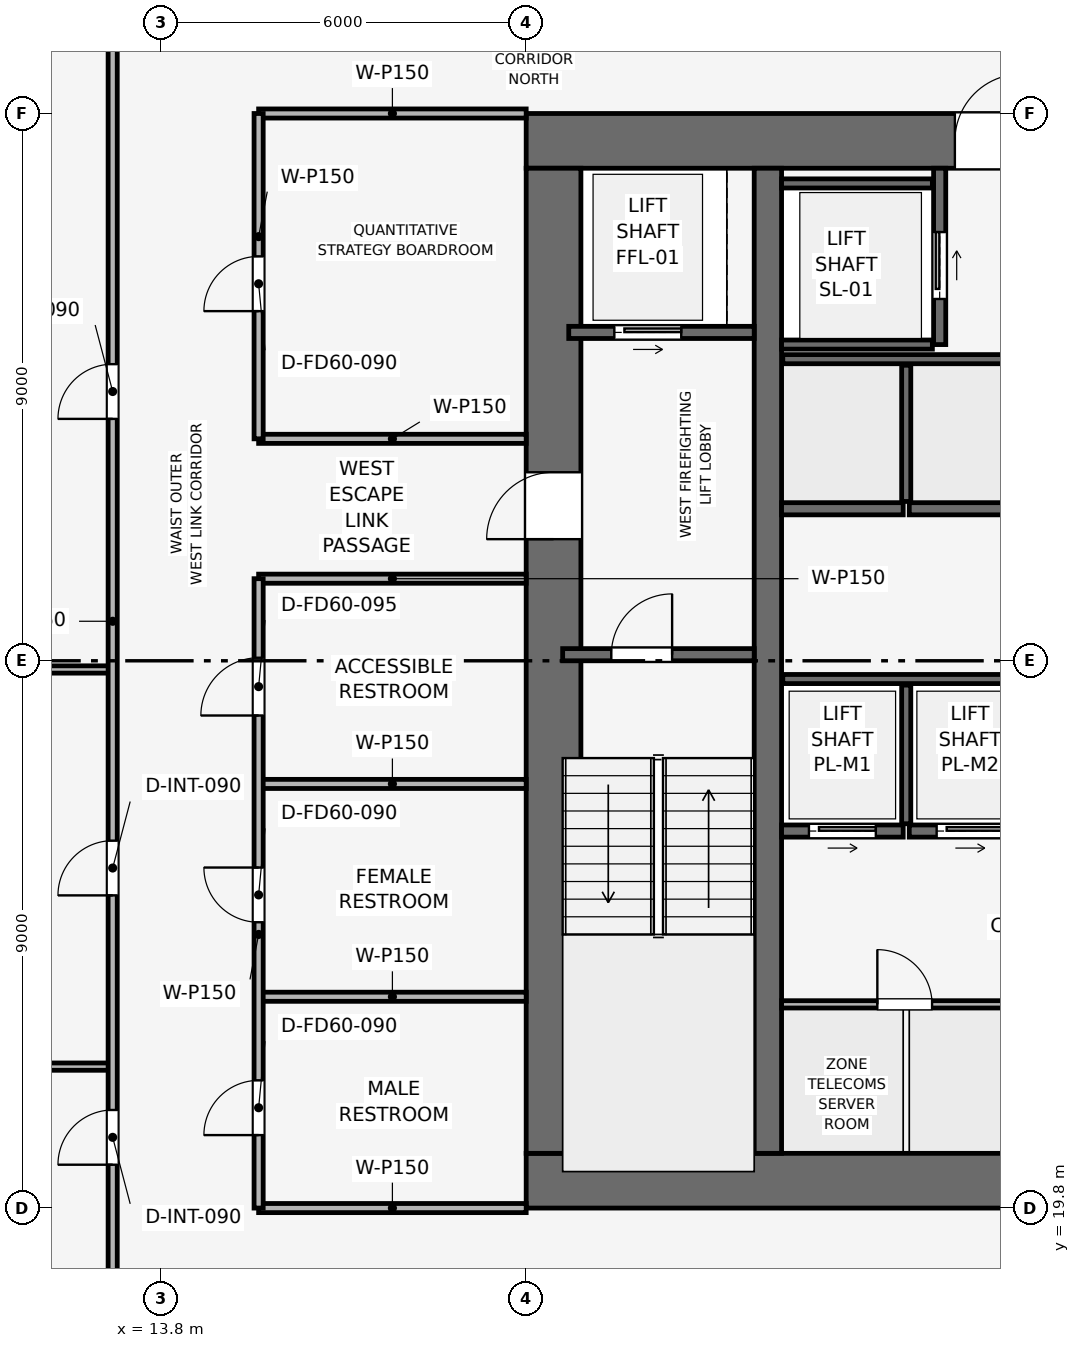
"""IFC4 building model, lengths in metres.
Left out: names, types, materials, properties, quantities, classifications, styles, units other than length and angle.
Written with IfcOpenShell. Run it as: python <this file> out.ifc"""

import sys

from ifc_helpers import new_model, si_unit, direction, frame, frame_2d, origin, place, context, subcontext, project, spatial, rectangle, extrude, element, fill, save


model = new_model("IFC4")
c1 = context("Model", 3, precision=1e-05, world=origin(), true_north=direction((0.0, 1.0)))
c2 = subcontext(c1, "Body", "Model", "MODEL_VIEW")
j1 = project(units=[si_unit("LENGTHUNIT", "METRE"), si_unit("PLANEANGLEUNIT", "RADIAN")], contexts=[c1])
p1 = place(None, origin())
s1 = spatial("IfcSite", under=j1, at=p1, CompositionType="ELEMENT")
p2 = place(p1, origin())
s2 = spatial("IfcBuilding", under=s1, at=p2, CompositionType="ELEMENT")
p3 = place(p2, frame((0.0, 0.0, 179.55)))
s3 = spatial("IfcBuildingStorey", under=s2, at=p3, CompositionType="ELEMENT", Elevation=179.55)
p4 = place(p3, frame((19.8, 20.25, 0.0), z_axis=(0.0, 0.0, 1.0), x_axis=(1.0, 0.0, 0.0)))
e1 = element("IfcWall", 1, at=p4, inside=s3, PredefinedType="SHEAR", context=c2, shape_type="SweptSolid", body=[
    extrude(rectangle(XDim=18.0, YDim=0.9, at=frame_2d((9.0, 0.0))), origin(), (0.0, 0.0, 1.0), 3.75),
])
p5 = place(p4, frame((8.4, 0.0, 0.0)))
e2 = element("IfcOpeningElement", 2, at=p5, cuts=e1, PredefinedType="OPENING", context=c2, shape_type="SweptSolid", body=[
    extrude(rectangle(XDim=1.2, YDim=2.2, at=frame_2d((0.6, 1.1))), frame((0.0, 0.46, 0.0), z_axis=(0.0, -1.0, 0.0), x_axis=(1.0, 0.0, 0.0)), (0.0, 0.0, 1.0), 0.92),
])
p6 = place(p3, frame((19.8, 37.35, 0.0), z_axis=(0.0, 0.0, 1.0), x_axis=(1.0, 0.0, 0.0)))
e3 = element("IfcWall", 3, at=p6, inside=s3, PredefinedType="SHEAR", context=c2, shape_type="SweptSolid", body=[
    extrude(rectangle(XDim=18.0, YDim=0.9, at=frame_2d((9.0, 0.0))), origin(), (0.0, 0.0, 1.0), 3.75),
])
p7 = place(p6, frame((7.05, 0.0, 0.0)))
e4 = element("IfcOpeningElement", 4, at=p7, cuts=e3, PredefinedType="OPENING", context=c2, shape_type="SweptSolid", body=[
    extrude(rectangle(XDim=1.1, YDim=2.15, at=frame_2d((0.55, 1.075))), frame((0.0, 0.46, 0.0), z_axis=(0.0, -1.0, 0.0), x_axis=(1.0, 0.0, 0.0)), (0.0, 0.0, 1.0), 0.92),
])
p8 = place(p3, frame((20.25, 20.7, 0.0), z_axis=(0.0, 0.0, 1.0), x_axis=(0.0, 1.0, 0.0)))
e5 = element("IfcWall", 5, at=p8, inside=s3, PredefinedType="SHEAR", context=c2, shape_type="SweptSolid", body=[
    extrude(rectangle(XDim=16.2, YDim=0.9, at=frame_2d((8.1, 0.0))), origin(), (0.0, 0.0, 1.0), 3.75),
])
p9 = place(p8, frame((10.1, 0.0, 0.0)))
e6 = element("IfcOpeningElement", 6, at=p9, cuts=e5, PredefinedType="OPENING", context=c2, shape_type="SweptSolid", body=[
    extrude(rectangle(XDim=1.1, YDim=2.15, at=frame_2d((0.55, 1.075))), frame((0.0, 0.46, 0.0), z_axis=(0.0, -1.0, 0.0), x_axis=(1.0, 0.0, 0.0)), (0.0, 0.0, 1.0), 0.92),
])
p10 = place(p3, frame((23.775, 20.7, 0.0), z_axis=(0.0, 0.0, 1.0), x_axis=(0.0, 1.0, 0.0)))
e7 = element("IfcWall", 7, at=p10, inside=s3, PredefinedType="SHEAR", context=c2, shape_type="SweptSolid", body=[
    extrude(rectangle(XDim=16.2, YDim=0.45, at=frame_2d((8.1, 0.0))), origin(), (0.0, 0.0, 1.0), 3.75),
])
p11 = place(p3, frame((20.4, 28.9, 0.0), z_axis=(0.0, 0.0, 1.0), x_axis=(1.0, 0.0, 0.0)))
e8 = element("IfcWall", 8, at=p11, inside=s3, PredefinedType="SHEAR", context=c2, shape_type="SweptSolid", body=[
    extrude(rectangle(XDim=3.15, YDim=0.2, at=frame_2d((1.575, 0.0))), origin(), (0.0, 0.0, 1.0), 3.495),
])
p12 = place(p11, frame((0.8, 0.0, 0.0)))
e9 = element("IfcOpeningElement", 9, at=p12, cuts=e8, PredefinedType="OPENING", context=c2, shape_type="SweptSolid", body=[
    extrude(rectangle(XDim=1.0, YDim=2.1, at=frame_2d((0.5, 1.05))), frame((0.0, 0.11, 0.0), z_axis=(0.0, -1.0, 0.0), x_axis=(1.0, 0.0, 0.0)), (0.0, 0.0, 1.0), 0.22),
])
p13 = place(p3, frame((20.5, 34.2, 0.0), z_axis=(0.0, 0.0, 1.0), x_axis=(1.0, 0.0, 0.0)))
e10 = element("IfcWall", 10, at=p13, inside=s3, PredefinedType="SHEAR", context=c2, shape_type="SweptSolid", body=[
    extrude(rectangle(XDim=3.05, YDim=0.2, at=frame_2d((1.525, 0.0))), origin(), (0.0, 0.0, 1.0), 3.495),
])
p14 = place(p13, frame((0.75, 0.0, 0.0)))
e11 = element("IfcOpeningElement", 11, at=p14, cuts=e10, PredefinedType="OPENING", context=c2, shape_type="SweptSolid", body=[
    extrude(rectangle(XDim=1.1, YDim=2.15, at=frame_2d((0.55, 1.075))), frame((0.0, 0.11, 0.0), z_axis=(0.0, -1.0, 0.0), x_axis=(1.0, 0.0, 0.0)), (0.0, 0.0, 1.0), 0.22),
])
p15 = place(p3, frame((26.6, 34.0, 0.0), z_axis=(0.0, 0.0, 1.0), x_axis=(0.0, 1.0, 0.0)))
e12 = element("IfcWall", 12, at=p15, inside=s3, PredefinedType="SHEAR", context=c2, shape_type="SweptSolid", body=[
    extrude(rectangle(XDim=2.9, YDim=0.2, at=frame_2d((1.45, 0.0))), origin(), (0.0, 0.0, 1.0), 3.495),
])
p16 = place(p15, frame((0.75, 0.0, 0.0)))
e13 = element("IfcOpeningElement", 13, at=p16, cuts=e12, PredefinedType="OPENING", context=c2, shape_type="SweptSolid", body=[
    extrude(rectangle(XDim=1.1, YDim=2.15, at=frame_2d((0.55, 1.075))), frame((0.0, 0.11, 0.0), z_axis=(0.0, -1.0, 0.0), x_axis=(1.0, 0.0, 0.0)), (0.0, 0.0, 1.0), 0.22),
])
for number, where, z_axis, x_axis in (
    (14, (24.0, 34.0, 0.0), (0.0, 0.0, 1.0), (1.0, 0.0, 0.0)),
    (15, (24.0, 36.65, 0.0), (0.0, 0.0, 1.0), (1.0, 0.0, 0.0)),
):
    element("IfcWall", number, at=place(p3, frame(where, z_axis=z_axis, x_axis=x_axis)), inside=s3, PredefinedType="SHEAR", context=c2, shape_type="SweptSolid", body=[
        extrude(rectangle(XDim=2.48, YDim=0.15, at=frame_2d((1.24, 0.0))), origin(), (0.0, 0.0, 1.0), 3.495),
    ])
p17 = place(p3, frame((24.0, 26.0, 0.0), z_axis=(0.0, 0.0, 1.0), x_axis=(1.0, 0.0, 0.0)))
e16 = element("IfcWall", 16, at=p17, inside=s3, PredefinedType="SHEAR", context=c2, shape_type="SweptSolid", body=[
    extrude(rectangle(XDim=2.0, YDim=0.2, at=frame_2d((1.0, 0.0))), origin(), (0.0, 0.0, 1.0), 3.495),
])
p18 = place(p17, frame((0.45, 0.0, 0.0)))
e17 = element("IfcOpeningElement", 17, at=p18, cuts=e16, PredefinedType="OPENING", context=c2, shape_type="SweptSolid", body=[
    extrude(rectangle(XDim=1.1, YDim=2.15, at=frame_2d((0.55, 1.075))), frame((0.0, 0.11, 0.0), z_axis=(0.0, -1.0, 0.0), x_axis=(1.0, 0.0, 0.0)), (0.0, 0.0, 1.0), 0.22),
])
p19 = place(p3, frame((26.1, 26.0, 0.0), z_axis=(0.0, 0.0, 1.0), x_axis=(1.0, 0.0, 0.0)))
e18 = element("IfcWall", 18, at=p19, inside=s3, PredefinedType="SHEAR", context=c2, shape_type="SweptSolid", body=[
    extrude(rectangle(XDim=2.0, YDim=0.2, at=frame_2d((1.0, 0.0))), origin(), (0.0, 0.0, 1.0), 3.495),
])
p20 = place(p19, frame((0.45, 0.0, 0.0)))
e19 = element("IfcOpeningElement", 19, at=p20, cuts=e18, PredefinedType="OPENING", context=c2, shape_type="SweptSolid", body=[
    extrude(rectangle(XDim=1.1, YDim=2.15, at=frame_2d((0.55, 1.075))), frame((0.0, 0.11, 0.0), z_axis=(0.0, -1.0, 0.0), x_axis=(1.0, 0.0, 0.0)), (0.0, 0.0, 1.0), 0.22),
])
for number, where, z_axis, x_axis in (
    (20, (24.0, 31.3, 0.0), (0.0, 0.0, 1.0), (1.0, 0.0, 0.0)),
    (21, (26.1, 31.3, 0.0), (0.0, 0.0, 1.0), (1.0, 0.0, 0.0)),
):
    element("IfcWall", number, at=place(p3, frame(where, z_axis=z_axis, x_axis=x_axis)), inside=s3, PredefinedType="SHEAR", context=c2, shape_type="SweptSolid", body=[
        extrude(rectangle(XDim=2.0, YDim=0.2, at=frame_2d((1.0, 0.0))), origin(), (0.0, 0.0, 1.0), 3.495),
    ])
p21 = place(p3, frame((24.02, 28.5, 0.0), z_axis=(0.0, 0.0, 1.0), x_axis=(1.0, 0.0, 0.0)))
e22 = element("IfcWall", 22, at=p21, inside=s3, PredefinedType="SHEAR", context=c2, shape_type="SweptSolid", body=[
    extrude(rectangle(XDim=4.08, YDim=0.15, at=frame_2d((2.04, 0.0))), origin(), (0.0, 0.0, 1.0), 3.495),
])
p22 = place(p3, frame((26.05, 26.12, 0.0), z_axis=(0.0, 0.0, 1.0), x_axis=(0.0, 1.0, 0.0)))
e23 = element("IfcWall", 23, at=p22, inside=s3, PredefinedType="SHEAR", context=c2, shape_type="SweptSolid", body=[
    extrude(rectangle(XDim=2.28, YDim=0.15, at=frame_2d((1.14, 0.0))), origin(), (0.0, 0.0, 1.0), 3.495),
])
p23 = place(p3, frame((24.02, 33.76, 0.0), z_axis=(0.0, 0.0, 1.0), x_axis=(1.0, 0.0, 0.0)))
e24 = element("IfcWall", 24, at=p23, inside=s3, PredefinedType="SHEAR", context=c2, shape_type="SweptSolid", body=[
    extrude(rectangle(XDim=4.08, YDim=0.15, at=frame_2d((2.04, 0.0))), origin(), (0.0, 0.0, 1.0), 3.495),
])
p24 = place(p3, frame((26.05, 31.42, 0.0), z_axis=(0.0, 0.0, 1.0), x_axis=(0.0, 1.0, 0.0)))
e25 = element("IfcWall", 25, at=p24, inside=s3, PredefinedType="SHEAR", context=c2, shape_type="SweptSolid", body=[
    extrude(rectangle(XDim=2.24, YDim=0.15, at=frame_2d((1.12, 0.0))), origin(), (0.0, 0.0, 1.0), 3.495),
])
p25 = place(p3, frame((24.0, 23.15, 0.0), z_axis=(0.0, 0.0, 1.0), x_axis=(1.0, 0.0, 0.0)))
e26 = element("IfcWall", 26, at=p25, inside=s3, PredefinedType="PARTITIONING", context=c2, shape_type="SweptSolid", body=[
    extrude(rectangle(XDim=4.05, YDim=0.12, at=frame_2d((2.025, 0.0))), origin(), (0.0, 0.0, 1.0), 3.495),
])
p26 = place(p25, frame((1.575, 0.0, 0.0)))
e27 = element("IfcOpeningElement", 27, at=p26, cuts=e26, PredefinedType="OPENING", context=c2, shape_type="SweptSolid", body=[
    extrude(rectangle(XDim=0.9, YDim=2.1, at=frame_2d((0.45, 1.05))), frame((0.0, 0.07, 0.0), z_axis=(0.0, -1.0, 0.0), x_axis=(1.0, 0.0, 0.0)), (0.0, 0.0, 1.0), 0.14),
])
p27 = place(p3, frame((15.4, 19.8, 0.0), z_axis=(0.0, 0.0, 1.0), x_axis=(1.0, 0.0, 0.0)))
e28 = element("IfcWall", 28, at=p27, inside=s3, PredefinedType="PARTITIONING", context=c2, shape_type="SweptSolid", body=[
    extrude(rectangle(XDim=4.4, YDim=0.15, at=frame_2d((2.2, 0.0))), origin(), (0.0, 0.0, 1.0), 3.03),
])
for number, where, z_axis, x_axis in (
    (29, (15.4, 23.275, 0.0), (0.0, 0.0, 1.0), (1.0, 0.0, 0.0)),
    (30, (15.4, 26.775, 0.0), (0.0, 0.0, 1.0), (1.0, 0.0, 0.0)),
    (31, (15.4, 30.15, 0.0), (0.0, 0.0, 1.0), (1.0, 0.0, 0.0)),
    (32, (15.4, 32.45, 0.0), (0.0, 0.0, 1.0), (1.0, 0.0, 0.0)),
):
    element("IfcWall", number, at=place(p3, frame(where, z_axis=z_axis, x_axis=x_axis)), inside=s3, PredefinedType="PARTITIONING", context=c2, shape_type="SweptSolid", body=[
        extrude(rectangle(XDim=4.4, YDim=0.15, at=frame_2d((2.2, 0.0))), origin(), (0.0, 0.0, 1.0), 3.495),
    ])
p28 = place(p3, frame((15.4, 37.8, 0.0), z_axis=(0.0, 0.0, 1.0), x_axis=(1.0, 0.0, 0.0)))
e33 = element("IfcWall", 33, at=p28, inside=s3, PredefinedType="PARTITIONING", context=c2, shape_type="SweptSolid", body=[
    extrude(rectangle(XDim=4.4, YDim=0.15, at=frame_2d((2.2, 0.0))), origin(), (0.0, 0.0, 1.0), 3.03),
])
p29 = place(p3, frame((15.4, 19.8, 0.0), z_axis=(0.0, 0.0, 1.0), x_axis=(0.0, 1.0, 0.0)))
e34 = element("IfcWall", 34, at=p29, inside=s3, PredefinedType="PARTITIONING", context=c2, shape_type="SweptSolid", body=[
    extrude(rectangle(XDim=10.35, YDim=0.15, at=frame_2d((5.175, 0.0))), origin(), (0.0, 0.0, 1.0), 3.03),
])
p30 = place(p29, frame((1.2, 0.0, 0.0)))
e35 = element("IfcOpeningElement", 35, at=p30, cuts=e34, PredefinedType="OPENING", context=c2, shape_type="SweptSolid", body=[
    extrude(rectangle(XDim=0.9, YDim=2.1, at=frame_2d((0.45, 1.05))), frame((0.0, 0.085, 0.0), z_axis=(0.0, -1.0, 0.0), x_axis=(1.0, 0.0, 0.0)), (0.0, 0.0, 1.0), 0.17),
])
p31 = place(p29, frame((4.7, 0.0, 0.0)))
e36 = element("IfcOpeningElement", 36, at=p31, cuts=e34, PredefinedType="OPENING", context=c2, shape_type="SweptSolid", body=[
    extrude(rectangle(XDim=0.9, YDim=2.1, at=frame_2d((0.45, 1.05))), frame((0.0, 0.085, 0.0), z_axis=(0.0, -1.0, 0.0), x_axis=(1.0, 0.0, 0.0)), (0.0, 0.0, 1.0), 0.17),
])
p32 = place(p29, frame((8.1, 0.0, 0.0)))
e37 = element("IfcOpeningElement", 37, at=p32, cuts=e34, PredefinedType="OPENING", context=c2, shape_type="SweptSolid", body=[
    extrude(rectangle(XDim=0.95, YDim=2.1, at=frame_2d((0.475, 1.05))), frame((0.0, 0.085, 0.0), z_axis=(0.0, -1.0, 0.0), x_axis=(1.0, 0.0, 0.0)), (0.0, 0.0, 1.0), 0.17),
])
p33 = place(p3, frame((15.4, 32.45, 0.0), z_axis=(0.0, 0.0, 1.0), x_axis=(0.0, 1.0, 0.0)))
e38 = element("IfcWall", 38, at=p33, inside=s3, PredefinedType="PARTITIONING", context=c2, shape_type="SweptSolid", body=[
    extrude(rectangle(XDim=5.35, YDim=0.15, at=frame_2d((2.675, 0.0))), origin(), (0.0, 0.0, 1.0), 3.03),
])
p34 = place(p33, frame((2.1, 0.0, 0.0)))
e39 = element("IfcOpeningElement", 39, at=p34, cuts=e38, PredefinedType="OPENING", context=c2, shape_type="SweptSolid", body=[
    extrude(rectangle(XDim=0.9, YDim=2.1, at=frame_2d((0.45, 1.05))), frame((0.0, 0.085, 0.0), z_axis=(0.0, -1.0, 0.0), x_axis=(1.0, 0.0, 0.0)), (0.0, 0.0, 1.0), 0.17),
])
for number, where, z_axis, x_axis in (
    (40, (4.63, 22.126, 0.0), (0.0, 0.0, 1.0), (1.0, 0.0, 0.0)),
    (41, (4.63, 28.657, 0.0), (0.0, 0.0, 1.0), (1.0, 0.0, 0.0)),
):
    element("IfcWall", number, at=place(p3, frame(where, z_axis=z_axis, x_axis=x_axis)), inside=s3, PredefinedType="PARTITIONING", context=c2, shape_type="SweptSolid", body=[
        extrude(rectangle(XDim=8.37, YDim=0.12, at=frame_2d((4.185, 0.0))), origin(), (0.0, 0.0, 1.0), 2.98),
    ])
p35 = place(p3, frame((13.0, 17.4, 0.0), z_axis=(0.0, 0.0, 1.0), x_axis=(0.0, 1.0, 0.0)))
e42 = element("IfcWall", 42, at=p35, inside=s3, PredefinedType="PARTITIONING", context=c2, shape_type="SweptSolid", body=[
    extrude(rectangle(XDim=22.8, YDim=0.15, at=frame_2d((11.4, 0.0))), origin(), (0.0, 0.0, 1.0), 3.03),
])
p36 = place(p35, frame((3.113, 0.0, 0.0)))
e43 = element("IfcOpeningElement", 43, at=p36, cuts=e42, PredefinedType="OPENING", context=c2, shape_type="SweptSolid", body=[
    extrude(rectangle(XDim=0.9, YDim=2.1, at=frame_2d((0.45, 1.05))), frame((0.0, 0.085, 0.0), z_axis=(0.0, -1.0, 0.0), x_axis=(1.0, 0.0, 0.0)), (0.0, 0.0, 1.0), 0.17),
])
p37 = place(p35, frame((7.542, 0.0, 0.0)))
e44 = element("IfcOpeningElement", 44, at=p37, cuts=e42, PredefinedType="OPENING", context=c2, shape_type="SweptSolid", body=[
    extrude(rectangle(XDim=0.9, YDim=2.1, at=frame_2d((0.45, 1.05))), frame((0.0, 0.085, 0.0), z_axis=(0.0, -1.0, 0.0), x_axis=(1.0, 0.0, 0.0)), (0.0, 0.0, 1.0), 0.17),
])
p38 = place(p35, frame((15.378, 0.0, 0.0)))
e45 = element("IfcOpeningElement", 45, at=p38, cuts=e42, PredefinedType="OPENING", context=c2, shape_type="SweptSolid", body=[
    extrude(rectangle(XDim=0.9, YDim=2.1, at=frame_2d((0.45, 1.05))), frame((0.0, 0.085, 0.0), z_axis=(0.0, -1.0, 0.0), x_axis=(1.0, 0.0, 0.0)), (0.0, 0.0, 1.0), 0.17),
])
p39 = place(p12, origin())
e46 = element("IfcDoor", 46, at=p39, inside=s3, OperationType="SINGLE_SWING_RIGHT", PredefinedType="DOOR", context=c2, shape_type="SweptSolid", body=[
    extrude(rectangle(XDim=1.0, YDim=2.1, at=frame_2d((0.5, 1.05))), frame((0.0, 0.025, 0.0), z_axis=(0.0, -1.0, 0.0), x_axis=(1.0, 0.0, 0.0)), (0.0, 0.0, 1.0), 0.05),
])
fill(e9, e46)
p40 = place(p14, origin())
e47 = element("IfcDoor", 47, at=p40, inside=s3, OperationType="SLIDING_TO_RIGHT", PredefinedType="DOOR", context=c2, shape_type="SweptSolid", body=[
    extrude(rectangle(XDim=1.1, YDim=2.15, at=frame_2d((0.55, 1.075))), frame((0.0, 0.025, 0.0), z_axis=(0.0, -1.0, 0.0), x_axis=(1.0, 0.0, 0.0)), (0.0, 0.0, 1.0), 0.05),
])
fill(e11, e47)
p41 = place(p16, origin())
e48 = element("IfcDoor", 48, at=p41, inside=s3, OperationType="SLIDING_TO_RIGHT", PredefinedType="DOOR", context=c2, shape_type="SweptSolid", body=[
    extrude(rectangle(XDim=1.1, YDim=2.15, at=frame_2d((0.55, 1.075))), frame((0.0, 0.025, 0.0), z_axis=(0.0, -1.0, 0.0), x_axis=(1.0, 0.0, 0.0)), (0.0, 0.0, 1.0), 0.05),
])
fill(e13, e48)
p42 = place(p18, origin())
e49 = element("IfcDoor", 49, at=p42, inside=s3, OperationType="SLIDING_TO_RIGHT", PredefinedType="DOOR", context=c2, shape_type="SweptSolid", body=[
    extrude(rectangle(XDim=1.1, YDim=2.15, at=frame_2d((0.55, 1.075))), frame((0.0, 0.025, 0.0), z_axis=(0.0, -1.0, 0.0), x_axis=(1.0, 0.0, 0.0)), (0.0, 0.0, 1.0), 0.05),
])
fill(e17, e49)
p43 = place(p20, origin())
e50 = element("IfcDoor", 50, at=p43, inside=s3, OperationType="SLIDING_TO_RIGHT", PredefinedType="DOOR", context=c2, shape_type="SweptSolid", body=[
    extrude(rectangle(XDim=1.1, YDim=2.15, at=frame_2d((0.55, 1.075))), frame((0.0, 0.025, 0.0), z_axis=(0.0, -1.0, 0.0), x_axis=(1.0, 0.0, 0.0)), (0.0, 0.0, 1.0), 0.05),
])
fill(e19, e50)
p44 = place(p26, origin())
e51 = element("IfcDoor", 51, at=p44, inside=s3, OperationType="SINGLE_SWING_LEFT", PredefinedType="DOOR", context=c2, shape_type="SweptSolid", body=[
    extrude(rectangle(XDim=0.9, YDim=2.1, at=frame_2d((0.45, 1.05))), frame((0.0, 0.025, 0.0), z_axis=(0.0, -1.0, 0.0), x_axis=(1.0, 0.0, 0.0)), (0.0, 0.0, 1.0), 0.05),
])
fill(e27, e51)
p45 = place(p30, origin())
e52 = element("IfcDoor", 52, at=p45, inside=s3, OperationType="SINGLE_SWING_LEFT", PredefinedType="DOOR", context=c2, shape_type="SweptSolid", body=[
    extrude(rectangle(XDim=0.9, YDim=2.1, at=frame_2d((0.45, 1.05))), frame((0.0, 0.025, 0.0), z_axis=(0.0, -1.0, 0.0), x_axis=(1.0, 0.0, 0.0)), (0.0, 0.0, 1.0), 0.05),
])
fill(e35, e52)
p46 = place(p31, origin())
e53 = element("IfcDoor", 53, at=p46, inside=s3, OperationType="SINGLE_SWING_RIGHT", PredefinedType="DOOR", context=c2, shape_type="SweptSolid", body=[
    extrude(rectangle(XDim=0.9, YDim=2.1, at=frame_2d((0.45, 1.05))), frame((0.0, 0.025, 0.0), z_axis=(0.0, -1.0, 0.0), x_axis=(1.0, 0.0, 0.0)), (0.0, 0.0, 1.0), 0.05),
])
fill(e36, e53)
p47 = place(p32, origin())
e54 = element("IfcDoor", 54, at=p47, inside=s3, OperationType="SINGLE_SWING_LEFT", PredefinedType="DOOR", context=c2, shape_type="SweptSolid", body=[
    extrude(rectangle(XDim=0.95, YDim=2.1, at=frame_2d((0.475, 1.05))), frame((0.0, 0.025, 0.0), z_axis=(0.0, -1.0, 0.0), x_axis=(1.0, 0.0, 0.0)), (0.0, 0.0, 1.0), 0.05),
])
fill(e37, e54)
p48 = place(p34, origin())
e55 = element("IfcDoor", 55, at=p48, inside=s3, OperationType="SINGLE_SWING_LEFT", PredefinedType="DOOR", context=c2, shape_type="SweptSolid", body=[
    extrude(rectangle(XDim=0.9, YDim=2.1, at=frame_2d((0.45, 1.05))), frame((0.0, 0.025, 0.0), z_axis=(0.0, -1.0, 0.0), x_axis=(1.0, 0.0, 0.0)), (0.0, 0.0, 1.0), 0.05),
])
fill(e39, e55)
p49 = place(p36, origin())
e56 = element("IfcDoor", 56, at=p49, inside=s3, OperationType="SINGLE_SWING_LEFT", PredefinedType="DOOR", context=c2, shape_type="SweptSolid", body=[
    extrude(rectangle(XDim=0.9, YDim=2.1, at=frame_2d((0.45, 1.05))), frame((0.0, 0.025, 0.0), z_axis=(0.0, -1.0, 0.0), x_axis=(1.0, 0.0, 0.0)), (0.0, 0.0, 1.0), 0.05),
])
fill(e43, e56)
p50 = place(p37, origin())
e57 = element("IfcDoor", 57, at=p50, inside=s3, OperationType="SINGLE_SWING_LEFT", PredefinedType="DOOR", context=c2, shape_type="SweptSolid", body=[
    extrude(rectangle(XDim=0.9, YDim=2.1, at=frame_2d((0.45, 1.05))), frame((0.0, 0.025, 0.0), z_axis=(0.0, -1.0, 0.0), x_axis=(1.0, 0.0, 0.0)), (0.0, 0.0, 1.0), 0.05),
])
fill(e44, e57)
p51 = place(p38, origin())
e58 = element("IfcDoor", 58, at=p51, inside=s3, OperationType="SINGLE_SWING_LEFT", PredefinedType="DOOR", context=c2, shape_type="SweptSolid", body=[
    extrude(rectangle(XDim=0.9, YDim=2.1, at=frame_2d((0.45, 1.05))), frame((0.0, 0.025, 0.0), z_axis=(0.0, -1.0, 0.0), x_axis=(1.0, 0.0, 0.0)), (0.0, 0.0, 1.0), 0.05),
])
fill(e45, e58)
p52 = place(p9, origin())
e59 = element("IfcDoor", 59, at=p52, inside=s3, OperationType="SINGLE_SWING_LEFT", PredefinedType="DOOR", context=c2, shape_type="SweptSolid", body=[
    extrude(rectangle(XDim=1.1, YDim=2.15, at=frame_2d((0.55, 1.075))), frame((0.0, 0.025, 0.0), z_axis=(0.0, -1.0, 0.0), x_axis=(1.0, 0.0, 0.0)), (0.0, 0.0, 1.0), 0.05),
])
fill(e6, e59)
p53 = place(p7, origin())
e60 = element("IfcDoor", 60, at=p53, inside=s3, OperationType="SINGLE_SWING_RIGHT", PredefinedType="DOOR", context=c2, shape_type="SweptSolid", body=[
    extrude(rectangle(XDim=1.1, YDim=2.15, at=frame_2d((0.55, 1.075))), frame((0.0, 0.025, 0.0), z_axis=(0.0, -1.0, 0.0), x_axis=(1.0, 0.0, 0.0)), (0.0, 0.0, 1.0), 0.05),
])
fill(e4, e60)
save(model, sys.argv[1])
